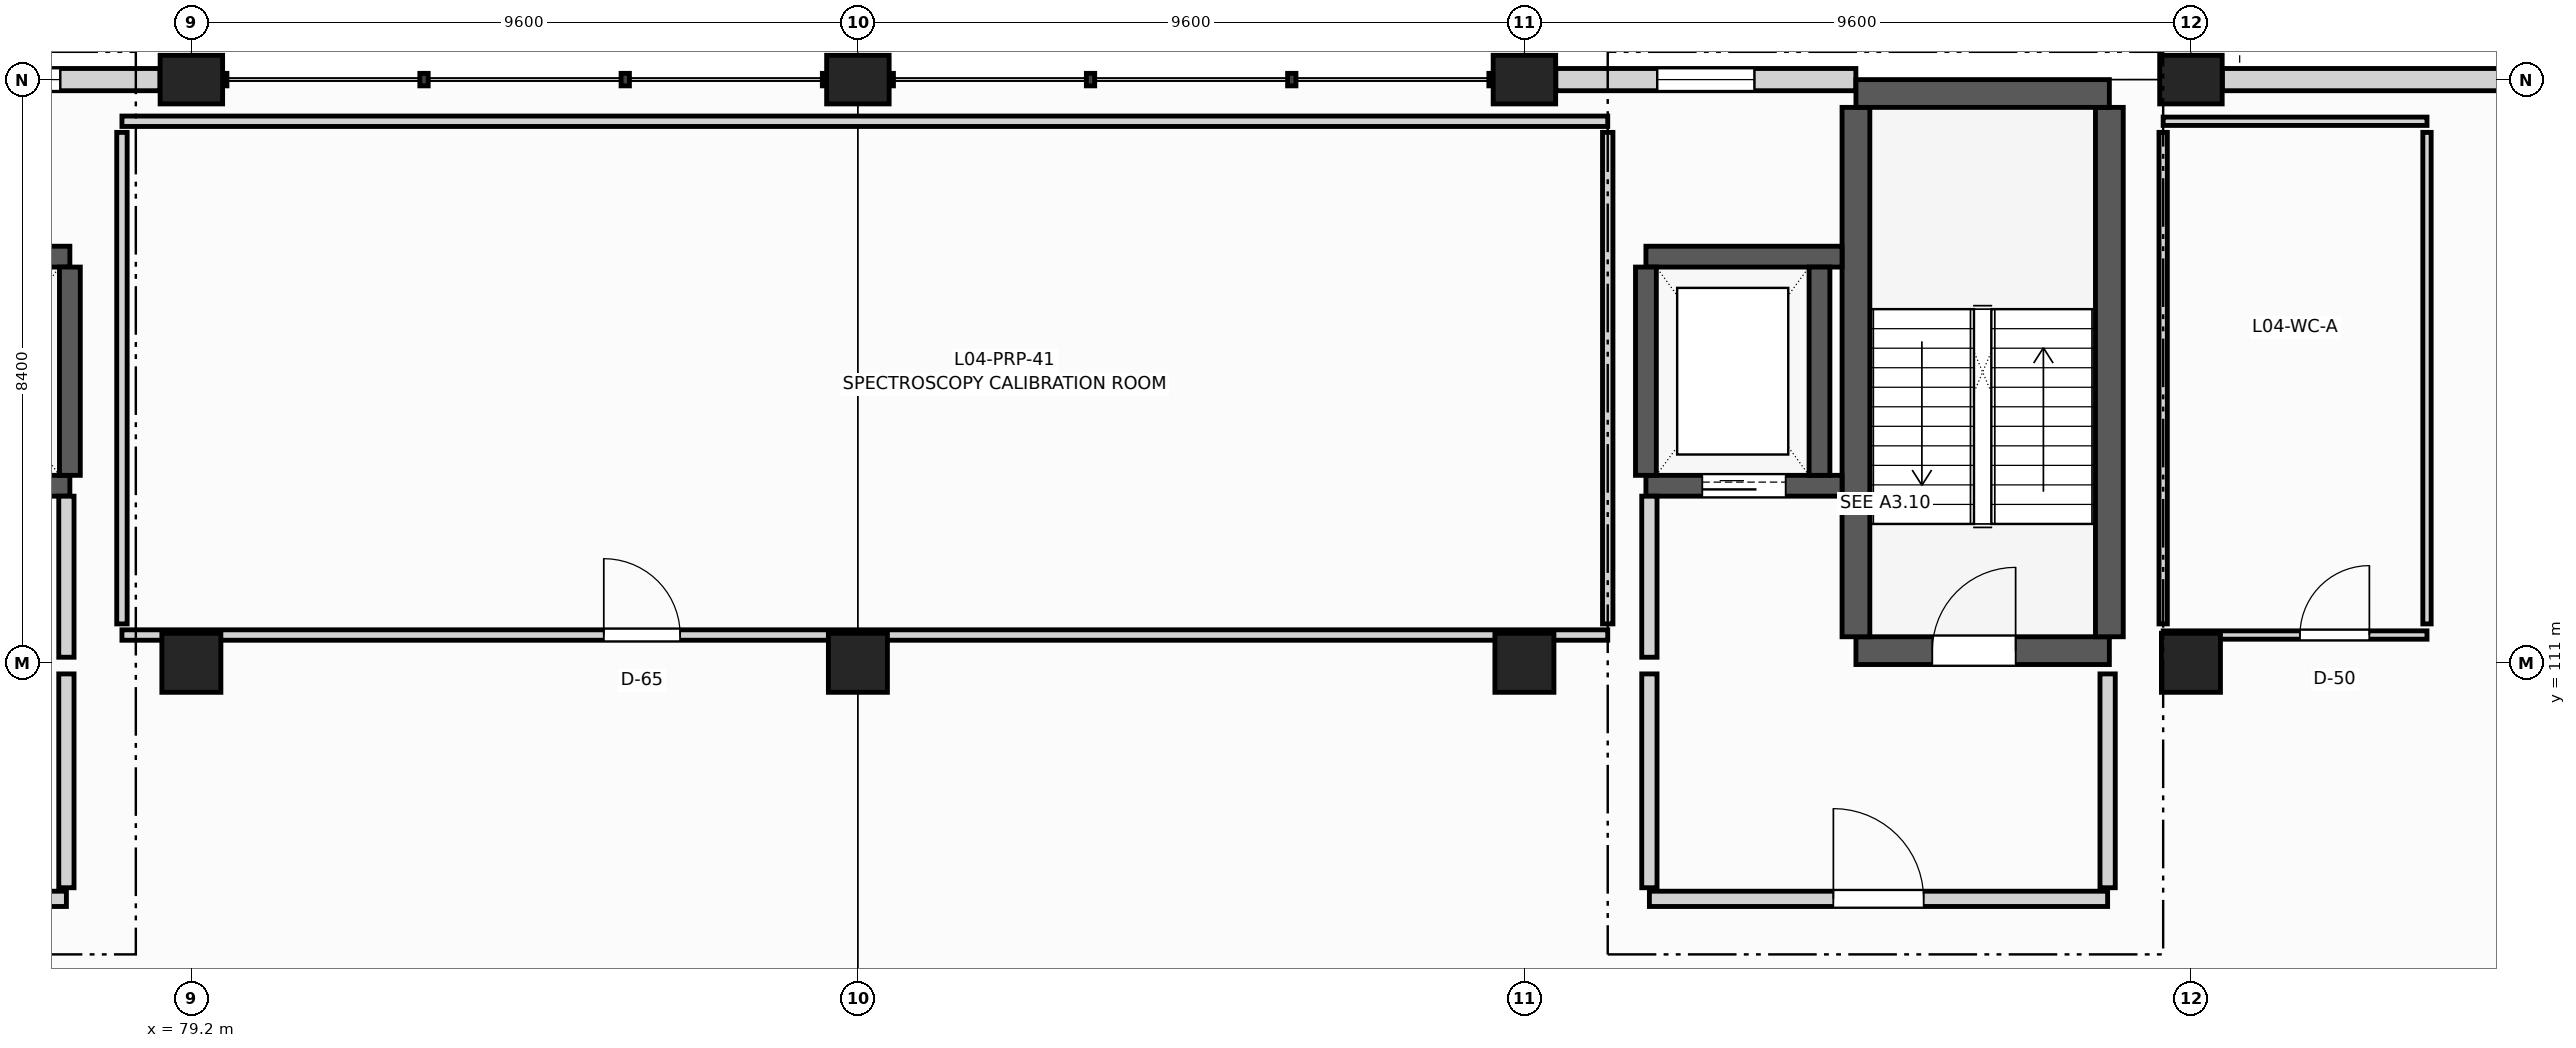
"""IFC4 building model, lengths in metres.
Left out: names, types, materials, properties, quantities, classifications, styles, units other than length and angle.
Written with IfcOpenShell. Run it as: python <this file> out.ifc"""

import sys

from ifc_helpers import new_model, si_unit, direction, frame, frame_2d, origin, origin_2d, place, context, subcontext, project, spatial, rectangle, extrude, element, fill, save


model = new_model("IFC4")
c1 = context("Model", 3, precision=1e-05, world=origin(), true_north=direction((0.0, 1.0)))
c2 = subcontext(c1, "Body", "Model", "MODEL_VIEW")
j1 = project(units=[si_unit("LENGTHUNIT", "METRE"), si_unit("PLANEANGLEUNIT", "RADIAN")], contexts=[c1])
p1 = place(None, origin())
s1 = spatial("IfcSite", under=j1, at=p1, CompositionType="ELEMENT")
p2 = place(p1, origin())
s2 = spatial("IfcBuilding", under=s1, at=p2, CompositionType="ELEMENT")
p3 = place(p2, frame((0.0, 0.0, 18.3)))
s3 = spatial("IfcBuildingStorey", under=s2, at=p3, CompositionType="ELEMENT", Elevation=18.3)
p4 = place(p3, frame((79.2, 111.0, 0.0), z_axis=(0.0, 0.0, 1.0), x_axis=(1.0, 0.0, 0.0)))
e1 = element("IfcColumn", 1, at=p4, inside=s3, PredefinedType="COLUMN", context=c2, shape_type="SweptSolid", body=[
    extrude(rectangle(XDim=0.85, YDim=0.85, at=origin_2d()), origin(), (0.0, 0.0, 1.0), 3.9),
])
p5 = place(p3, frame((79.2, 119.4, 0.0), z_axis=(0.0, 0.0, 1.0), x_axis=(1.0, 0.0, 0.0)))
e2 = element("IfcColumn", 2, at=p5, inside=s3, PredefinedType="COLUMN", context=c2, shape_type="SweptSolid", body=[
    extrude(rectangle(XDim=0.9, YDim=0.7, at=origin_2d()), origin(), (0.0, 0.0, 1.0), 3.9),
])
p6 = place(p3, frame((88.8, 111.0, 0.0), z_axis=(0.0, 0.0, 1.0), x_axis=(1.0, 0.0, 0.0)))
e3 = element("IfcColumn", 3, at=p6, inside=s3, PredefinedType="COLUMN", context=c2, shape_type="SweptSolid", body=[
    extrude(rectangle(XDim=0.85, YDim=0.85, at=origin_2d()), origin(), (0.0, 0.0, 1.0), 3.9),
])
p7 = place(p3, frame((88.8, 119.4, 0.0), z_axis=(0.0, 0.0, 1.0), x_axis=(1.0, 0.0, 0.0)))
e4 = element("IfcColumn", 4, at=p7, inside=s3, PredefinedType="COLUMN", context=c2, shape_type="SweptSolid", body=[
    extrude(rectangle(XDim=0.9, YDim=0.7, at=origin_2d()), origin(), (0.0, 0.0, 1.0), 3.9),
])
p8 = place(p3, frame((98.4, 111.0, 0.0), z_axis=(0.0, 0.0, 1.0), x_axis=(1.0, 0.0, 0.0)))
e5 = element("IfcColumn", 5, at=p8, inside=s3, PredefinedType="COLUMN", context=c2, shape_type="SweptSolid", body=[
    extrude(rectangle(XDim=0.85, YDim=0.85, at=origin_2d()), origin(), (0.0, 0.0, 1.0), 3.9),
])
p9 = place(p3, frame((98.4, 119.4, 0.0), z_axis=(0.0, 0.0, 1.0), x_axis=(1.0, 0.0, 0.0)))
e6 = element("IfcColumn", 6, at=p9, inside=s3, PredefinedType="COLUMN", context=c2, shape_type="SweptSolid", body=[
    extrude(rectangle(XDim=0.9, YDim=0.7, at=origin_2d()), origin(), (0.0, 0.0, 1.0), 3.9),
])
p10 = place(p3, frame((108.0, 111.0, 0.0), z_axis=(0.0, 0.0, 1.0), x_axis=(1.0, 0.0, 0.0)))
e7 = element("IfcColumn", 7, at=p10, inside=s3, PredefinedType="COLUMN", context=c2, shape_type="SweptSolid", body=[
    extrude(rectangle(XDim=0.85, YDim=0.85, at=origin_2d()), origin(), (0.0, 0.0, 1.0), 3.9),
])
p11 = place(p3, frame((108.0, 119.4, 0.0), z_axis=(0.0, 0.0, 1.0), x_axis=(1.0, 0.0, 0.0)))
e8 = element("IfcColumn", 8, at=p11, inside=s3, PredefinedType="COLUMN", context=c2, shape_type="SweptSolid", body=[
    extrude(rectangle(XDim=0.9, YDim=0.7, at=origin_2d()), origin(), (0.0, 0.0, 1.0), 3.9),
])
p12 = place(p3, frame((74.476, 119.4, 0.0), z_axis=(0.0, 0.0, 1.0), x_axis=(1.0, 0.0, 0.0)))
e9 = element("IfcWall", 9, at=p12, inside=s3, PredefinedType="SOLIDWALL", context=c2, shape_type="SweptSolid", body=[
    extrude(rectangle(XDim=4.272, YDim=0.32, at=frame_2d((2.136, 0.0))), origin(), (0.0, 0.0, 1.0), 3.08),
])
p13 = place(p12, frame((1.436, 0.0, 0.9)))
e10 = element("IfcOpeningElement", 10, at=p13, cuts=e9, PredefinedType="OPENING", context=c2, shape_type="SweptSolid", body=[
    extrude(rectangle(XDim=1.4, YDim=1.65, at=frame_2d((0.7, 0.825))), frame((0.0, 0.17, 0.0), z_axis=(0.0, -1.0, 0.0), x_axis=(1.0, 0.0, 0.0)), (0.0, 0.0, 1.0), 0.34),
])
p14 = place(p3, frame((98.852, 119.4, 0.0), z_axis=(0.0, 0.0, 1.0), x_axis=(1.0, 0.0, 0.0)))
e11 = element("IfcWall", 11, at=p14, inside=s3, PredefinedType="SOLIDWALL", context=c2, shape_type="SweptSolid", body=[
    extrude(rectangle(XDim=4.322, YDim=0.32, at=frame_2d((2.161, 0.0))), origin(), (0.0, 0.0, 1.0), 3.08),
])
p15 = place(p14, frame((1.461, 0.0, 0.9)))
e12 = element("IfcOpeningElement", 12, at=p15, cuts=e11, PredefinedType="OPENING", context=c2, shape_type="SweptSolid", body=[
    extrude(rectangle(XDim=1.4, YDim=1.65, at=frame_2d((0.7, 0.825))), frame((0.0, 0.17, 0.0), z_axis=(0.0, -1.0, 0.0), x_axis=(1.0, 0.0, 0.0)), (0.0, 0.0, 1.0), 0.34),
])
p16 = place(p3, frame((108.452, 119.4, 0.0), z_axis=(0.0, 0.0, 1.0), x_axis=(1.0, 0.0, 0.0)))
e13 = element("IfcWall", 13, at=p16, inside=s3, PredefinedType="SOLIDWALL", context=c2, shape_type="SweptSolid", body=[
    extrude(rectangle(XDim=8.696, YDim=0.32, at=frame_2d((4.348, 0.0))), origin(), (0.0, 0.0, 1.0), 3.08),
])
p17 = place(p16, frame((4.848, 0.0, 1.45)))
e14 = element("IfcOpeningElement", 14, at=p17, cuts=e13, PredefinedType="OPENING", context=c2, shape_type="SweptSolid", body=[
    extrude(rectangle(XDim=3.0, YDim=1.35, at=frame_2d((1.5, 0.675))), frame((0.0, 0.17, 0.0), z_axis=(0.0, -1.0, 0.0), x_axis=(1.0, 0.0, 0.0)), (0.0, 0.0, 1.0), 0.34),
])
p18 = place(p3, frame((103.175, 111.175, 0.0), z_axis=(0.0, 0.0, 1.0), x_axis=(1.0, 0.0, 0.0)))
e15 = element("IfcWall", 15, at=p18, inside=s3, PredefinedType="SHEAR", context=c2, shape_type="SweptSolid", body=[
    extrude(rectangle(XDim=3.65, YDim=0.4, at=frame_2d((1.825, 0.0))), origin(), (0.0, 0.0, 1.0), 3.9),
])
p19 = place(p18, frame((1.1, 0.0, 0.0)))
e16 = element("IfcOpeningElement", 16, at=p19, cuts=e15, PredefinedType="OPENING", context=c2, shape_type="SweptSolid", body=[
    extrude(rectangle(XDim=1.2, YDim=2.2, at=frame_2d((0.6, 1.1))), frame((0.0, 0.21, 0.0), z_axis=(0.0, -1.0, 0.0), x_axis=(1.0, 0.0, 0.0)), (0.0, 0.0, 1.0), 0.42),
])
for number, where, z_axis, x_axis in (
    (17, (103.175, 111.375, 0.0), (0.0, 0.0, 1.0), (0.0, 1.0, 0.0)),
    (18, (106.825, 111.375, 0.0), (0.0, 0.0, 1.0), (0.0, 1.0, 0.0)),
):
    element("IfcWall", number, at=place(p3, frame(where, z_axis=z_axis, x_axis=x_axis)), inside=s3, PredefinedType="SHEAR", context=c2, shape_type="SweptSolid", body=[
        extrude(rectangle(XDim=7.625, YDim=0.4, at=frame_2d((3.812, 0.0))), origin(), (0.0, 0.0, 1.0), 3.9),
    ])
p20 = place(p3, frame((103.175, 119.2, 0.0), z_axis=(0.0, 0.0, 1.0), x_axis=(1.0, 0.0, 0.0)))
e19 = element("IfcWall", 19, at=p20, inside=s3, PredefinedType="SHEAR", context=c2, shape_type="SweptSolid", body=[
    extrude(rectangle(XDim=3.65, YDim=0.4, at=frame_2d((1.825, 0.0))), origin(), (0.0, 0.0, 1.0), 3.9),
])
p21 = place(p3, frame((74.7, 113.55, 0.0), z_axis=(0.0, 0.0, 1.0), x_axis=(1.0, 0.0, 0.0)))
e20 = element("IfcWall", 20, at=p21, inside=s3, PredefinedType="SHEAR", context=c2, shape_type="SweptSolid", body=[
    extrude(rectangle(XDim=2.75, YDim=0.3, at=frame_2d((1.375, 0.0))), origin(), (0.0, 0.0, 1.0), 3.9),
])
p22 = place(p21, frame((0.775, 0.0, 0.0)))
e21 = element("IfcOpeningElement", 21, at=p22, cuts=e20, PredefinedType="OPENING", context=c2, shape_type="SweptSolid", body=[
    extrude(rectangle(XDim=1.2, YDim=2.2, at=frame_2d((0.6, 1.1))), frame((0.0, 0.16, 0.0), z_axis=(0.0, -1.0, 0.0), x_axis=(1.0, 0.0, 0.0)), (0.0, 0.0, 1.0), 0.32),
])
p23 = place(p3, frame((74.7, 116.85, 0.0), z_axis=(0.0, 0.0, 1.0), x_axis=(1.0, 0.0, 0.0)))
e22 = element("IfcWall", 22, at=p23, inside=s3, PredefinedType="SHEAR", context=c2, shape_type="SweptSolid", body=[
    extrude(rectangle(XDim=2.75, YDim=0.3, at=frame_2d((1.375, 0.0))), origin(), (0.0, 0.0, 1.0), 3.9),
])
p24 = place(p3, frame((77.45, 113.7, 0.0), z_axis=(0.0, 0.0, 1.0), x_axis=(0.0, 1.0, 0.0)))
e23 = element("IfcWall", 23, at=p24, inside=s3, PredefinedType="SHEAR", context=c2, shape_type="SweptSolid", body=[
    extrude(rectangle(XDim=3.0, YDim=0.3, at=frame_2d((1.5, 0.0))), origin(), (0.0, 0.0, 1.0), 3.9),
])
p25 = place(p3, frame((100.15, 113.55, 0.0), z_axis=(0.0, 0.0, 1.0), x_axis=(1.0, 0.0, 0.0)))
e24 = element("IfcWall", 24, at=p25, inside=s3, PredefinedType="SHEAR", context=c2, shape_type="SweptSolid", body=[
    extrude(rectangle(XDim=2.825, YDim=0.3, at=frame_2d((1.413, 0.0))), origin(), (0.0, 0.0, 1.0), 3.9),
])
p26 = place(p25, frame((0.812, 0.0, 0.0)))
e25 = element("IfcOpeningElement", 25, at=p26, cuts=e24, PredefinedType="OPENING", context=c2, shape_type="SweptSolid", body=[
    extrude(rectangle(XDim=1.2, YDim=2.2, at=frame_2d((0.6, 1.1))), frame((0.0, 0.16, 0.0), z_axis=(0.0, -1.0, 0.0), x_axis=(1.0, 0.0, 0.0)), (0.0, 0.0, 1.0), 0.32),
])
p27 = place(p3, frame((100.15, 116.85, 0.0), z_axis=(0.0, 0.0, 1.0), x_axis=(1.0, 0.0, 0.0)))
e26 = element("IfcWall", 26, at=p27, inside=s3, PredefinedType="SHEAR", context=c2, shape_type="SweptSolid", body=[
    extrude(rectangle(XDim=2.825, YDim=0.3, at=frame_2d((1.413, 0.0))), origin(), (0.0, 0.0, 1.0), 3.9),
])
for number, where, z_axis, x_axis in (
    (27, (100.15, 113.7, 0.0), (0.0, 0.0, 1.0), (0.0, 1.0, 0.0)),
    (28, (102.65, 113.7, 0.0), (0.0, 0.0, 1.0), (0.0, 1.0, 0.0)),
):
    element("IfcWall", number, at=place(p3, frame(where, z_axis=z_axis, x_axis=x_axis)), inside=s3, PredefinedType="SHEAR", context=c2, shape_type="SweptSolid", body=[
        extrude(rectangle(XDim=3.0, YDim=0.3, at=frame_2d((1.5, 0.0))), origin(), (0.0, 0.0, 1.0), 3.9),
    ])
p28 = place(p3, frame((70.8, 107.6, 0.0), z_axis=(0.0, 0.0, 1.0), x_axis=(1.0, 0.0, 0.0)))
e29 = element("IfcWall", 29, at=p28, inside=s3, PredefinedType="PARTITIONING", context=c2, shape_type="SweptSolid", body=[
    extrude(rectangle(XDim=6.6, YDim=0.22, at=frame_2d((3.3, 0.0))), origin(), (0.0, 0.0, 1.0), 3.15),
])
p29 = place(p28, frame((2.65, 0.0, 0.0)))
e30 = element("IfcOpeningElement", 30, at=p29, cuts=e29, PredefinedType="OPENING", context=c2, shape_type="SweptSolid", body=[
    extrude(rectangle(XDim=1.3, YDim=2.2, at=frame_2d((0.65, 1.1))), frame((0.0, 0.12, 0.0), z_axis=(0.0, -1.0, 0.0), x_axis=(1.0, 0.0, 0.0)), (0.0, 0.0, 1.0), 0.24),
])
p30 = place(p3, frame((77.4, 111.08, 0.0), z_axis=(0.0, 0.0, 1.0), x_axis=(0.0, 1.0, 0.0)))
e31 = element("IfcWall", 31, at=p30, inside=s3, PredefinedType="PARTITIONING", context=c2, shape_type="SweptSolid", body=[
    extrude(rectangle(XDim=2.32, YDim=0.22, at=frame_2d((1.16, 0.0))), origin(), (0.0, 0.0, 1.0), 3.15),
])
p31 = place(p3, frame((77.4, 107.76, 0.0), z_axis=(0.0, 0.0, 1.0), x_axis=(0.0, 1.0, 0.0)))
e32 = element("IfcWall", 32, at=p31, inside=s3, PredefinedType="PARTITIONING", context=c2, shape_type="SweptSolid", body=[
    extrude(rectangle(XDim=3.08, YDim=0.22, at=frame_2d((1.54, 0.0))), origin(), (0.0, 0.0, 1.0), 3.15),
])
p32 = place(p3, frame((100.2, 107.6, 0.0), z_axis=(0.0, 0.0, 1.0), x_axis=(1.0, 0.0, 0.0)))
e33 = element("IfcWall", 33, at=p32, inside=s3, PredefinedType="PARTITIONING", context=c2, shape_type="SweptSolid", body=[
    extrude(rectangle(XDim=6.6, YDim=0.22, at=frame_2d((3.3, 0.0))), origin(), (0.0, 0.0, 1.0), 3.15),
])
p33 = place(p32, frame((2.65, 0.0, 0.0)))
e34 = element("IfcOpeningElement", 34, at=p33, cuts=e33, PredefinedType="OPENING", context=c2, shape_type="SweptSolid", body=[
    extrude(rectangle(XDim=1.3, YDim=2.2, at=frame_2d((0.65, 1.1))), frame((0.0, 0.12, 0.0), z_axis=(0.0, -1.0, 0.0), x_axis=(1.0, 0.0, 0.0)), (0.0, 0.0, 1.0), 0.24),
])
p34 = place(p3, frame((100.2, 111.08, 0.0), z_axis=(0.0, 0.0, 1.0), x_axis=(0.0, 1.0, 0.0)))
e35 = element("IfcWall", 35, at=p34, inside=s3, PredefinedType="PARTITIONING", context=c2, shape_type="SweptSolid", body=[
    extrude(rectangle(XDim=2.32, YDim=0.22, at=frame_2d((1.16, 0.0))), origin(), (0.0, 0.0, 1.0), 3.15),
])
for number, where, z_axis, x_axis in (
    (36, (100.2, 107.76, 0.0), (0.0, 0.0, 1.0), (0.0, 1.0, 0.0)),
    (37, (106.8, 107.76, 0.0), (0.0, 0.0, 1.0), (0.0, 1.0, 0.0)),
):
    element("IfcWall", number, at=place(p3, frame(where, z_axis=z_axis, x_axis=x_axis)), inside=s3, PredefinedType="PARTITIONING", context=c2, shape_type="SweptSolid", body=[
        extrude(rectangle(XDim=3.08, YDim=0.22, at=frame_2d((1.54, 0.0))), origin(), (0.0, 0.0, 1.0), 3.15),
    ])
p35 = place(p3, frame((78.2, 111.4, 0.0), z_axis=(0.0, 0.0, 1.0), x_axis=(1.0, 0.0, 0.0)))
e38 = element("IfcWall", 38, at=p35, inside=s3, PredefinedType="PARTITIONING", context=c2, shape_type="SweptSolid", body=[
    extrude(rectangle(XDim=21.4, YDim=0.15, at=frame_2d((10.7, 0.0))), origin(), (0.0, 0.0, 1.0), 3.15),
])
p36 = place(p35, frame((6.94, 0.0, 0.0)))
e39 = element("IfcOpeningElement", 39, at=p36, cuts=e38, PredefinedType="OPENING", context=c2, shape_type="SweptSolid", body=[
    extrude(rectangle(XDim=1.1, YDim=2.2, at=frame_2d((0.55, 1.1))), frame((0.0, 0.085, 0.0), z_axis=(0.0, -1.0, 0.0), x_axis=(1.0, 0.0, 0.0)), (0.0, 0.0, 1.0), 0.17),
])
p37 = place(p3, frame((78.2, 118.8, 0.0), z_axis=(0.0, 0.0, 1.0), x_axis=(1.0, 0.0, 0.0)))
e40 = element("IfcWall", 40, at=p37, inside=s3, PredefinedType="PARTITIONING", context=c2, shape_type="SweptSolid", body=[
    extrude(rectangle(XDim=21.4, YDim=0.15, at=frame_2d((10.7, 0.0))), origin(), (0.0, 0.0, 1.0), 3.15),
])
for number, where, z_axis, x_axis in (
    (41, (78.2, 111.56, 0.0), (0.0, 0.0, 1.0), (0.0, 1.0, 0.0)),
    (42, (99.6, 111.56, 0.0), (0.0, 0.0, 1.0), (0.0, 1.0, 0.0)),
):
    element("IfcWall", number, at=place(p3, frame(where, z_axis=z_axis, x_axis=x_axis)), inside=s3, PredefinedType="PARTITIONING", context=c2, shape_type="SweptSolid", body=[
        extrude(rectangle(XDim=7.08, YDim=0.15, at=frame_2d((3.54, 0.0))), origin(), (0.0, 0.0, 1.0), 3.15),
    ])
p38 = place(p3, frame((107.6, 111.4, 0.0), z_axis=(0.0, 0.0, 1.0), x_axis=(1.0, 0.0, 0.0)))
e43 = element("IfcWall", 43, at=p38, inside=s3, PredefinedType="PARTITIONING", context=c2, shape_type="SweptSolid", body=[
    extrude(rectangle(XDim=3.8, YDim=0.12, at=frame_2d((1.9, 0.0))), origin(), (0.0, 0.0, 1.0), 3.15),
])
p39 = place(p38, frame((1.97, 0.0, 0.0)))
e44 = element("IfcOpeningElement", 44, at=p39, cuts=e43, PredefinedType="OPENING", context=c2, shape_type="SweptSolid", body=[
    extrude(rectangle(XDim=1.0, YDim=2.15, at=frame_2d((0.5, 1.075))), frame((0.0, 0.07, 0.0), z_axis=(0.0, -1.0, 0.0), x_axis=(1.0, 0.0, 0.0)), (0.0, 0.0, 1.0), 0.14),
])
p40 = place(p3, frame((107.6, 118.8, 0.0), z_axis=(0.0, 0.0, 1.0), x_axis=(1.0, 0.0, 0.0)))
e45 = element("IfcWall", 45, at=p40, inside=s3, PredefinedType="PARTITIONING", context=c2, shape_type="SweptSolid", body=[
    extrude(rectangle(XDim=3.8, YDim=0.12, at=frame_2d((1.9, 0.0))), origin(), (0.0, 0.0, 1.0), 3.15),
])
for number, where, z_axis, x_axis in (
    (46, (107.6, 111.56, 0.0), (0.0, 0.0, 1.0), (0.0, 1.0, 0.0)),
    (47, (111.4, 111.56, 0.0), (0.0, 0.0, 1.0), (0.0, 1.0, 0.0)),
):
    element("IfcWall", number, at=place(p3, frame(where, z_axis=z_axis, x_axis=x_axis)), inside=s3, PredefinedType="PARTITIONING", context=c2, shape_type="SweptSolid", body=[
        extrude(rectangle(XDim=7.08, YDim=0.12, at=frame_2d((3.54, 0.0))), origin(), (0.0, 0.0, 1.0), 3.15),
    ])
p41 = place(p13, origin())
e48 = element("IfcWindow", 48, at=p41, inside=s3, PartitioningType="SINGLE_PANEL", PredefinedType="WINDOW", context=c2, shape_type="SweptSolid", body=[
    extrude(rectangle(XDim=1.4, YDim=1.65, at=frame_2d((0.7, 0.825))), frame((0.0, 0.03, 0.0), z_axis=(0.0, -1.0, 0.0), x_axis=(1.0, 0.0, 0.0)), (0.0, 0.0, 1.0), 0.06),
])
fill(e10, e48)
p42 = place(p15, origin())
e49 = element("IfcWindow", 49, at=p42, inside=s3, PartitioningType="SINGLE_PANEL", PredefinedType="WINDOW", context=c2, shape_type="SweptSolid", body=[
    extrude(rectangle(XDim=1.4, YDim=1.65, at=frame_2d((0.7, 0.825))), frame((0.0, 0.03, 0.0), z_axis=(0.0, -1.0, 0.0), x_axis=(1.0, 0.0, 0.0)), (0.0, 0.0, 1.0), 0.06),
])
fill(e12, e49)
p43 = place(p19, origin())
e50 = element("IfcDoor", 50, at=p43, inside=s3, OperationType="SINGLE_SWING_RIGHT", PredefinedType="DOOR", context=c2, shape_type="SweptSolid", body=[
    extrude(rectangle(XDim=1.2, YDim=2.2, at=frame_2d((0.6, 1.1))), frame((0.0, 0.025, 0.0), z_axis=(0.0, -1.0, 0.0), x_axis=(1.0, 0.0, 0.0)), (0.0, 0.0, 1.0), 0.05),
])
fill(e16, e50)
p44 = place(p26, origin())
e51 = element("IfcDoor", 51, at=p44, inside=s3, OperationType="SLIDING_TO_LEFT", PredefinedType="DOOR", context=c2, shape_type="SweptSolid", body=[
    extrude(rectangle(XDim=1.2, YDim=2.2, at=frame_2d((0.6, 1.1))), frame((0.0, 0.025, 0.0), z_axis=(0.0, -1.0, 0.0), x_axis=(1.0, 0.0, 0.0)), (0.0, 0.0, 1.0), 0.05),
])
fill(e25, e51)
p45 = place(p33, origin())
e52 = element("IfcDoor", 52, at=p45, inside=s3, OperationType="SINGLE_SWING_LEFT", PredefinedType="DOOR", context=c2, shape_type="SweptSolid", body=[
    extrude(rectangle(XDim=1.3, YDim=2.2, at=frame_2d((0.65, 1.1))), frame((0.0, 0.025, 0.0), z_axis=(0.0, -1.0, 0.0), x_axis=(1.0, 0.0, 0.0)), (0.0, 0.0, 1.0), 0.05),
])
fill(e34, e52)
p46 = place(p36, origin())
e53 = element("IfcDoor", 53, at=p46, inside=s3, OperationType="SINGLE_SWING_LEFT", PredefinedType="DOOR", context=c2, shape_type="SweptSolid", body=[
    extrude(rectangle(XDim=1.1, YDim=2.2, at=frame_2d((0.55, 1.1))), frame((0.0, 0.025, 0.0), z_axis=(0.0, -1.0, 0.0), x_axis=(1.0, 0.0, 0.0)), (0.0, 0.0, 1.0), 0.05),
])
fill(e39, e53)
p47 = place(p39, origin())
e54 = element("IfcDoor", 54, at=p47, inside=s3, OperationType="SINGLE_SWING_RIGHT", PredefinedType="DOOR", context=c2, shape_type="SweptSolid", body=[
    extrude(rectangle(XDim=1.0, YDim=2.15, at=frame_2d((0.5, 1.075))), frame((0.0, 0.025, 0.0), z_axis=(0.0, -1.0, 0.0), x_axis=(1.0, 0.0, 0.0)), (0.0, 0.0, 1.0), 0.05),
])
fill(e44, e54)
save(model, sys.argv[1])
